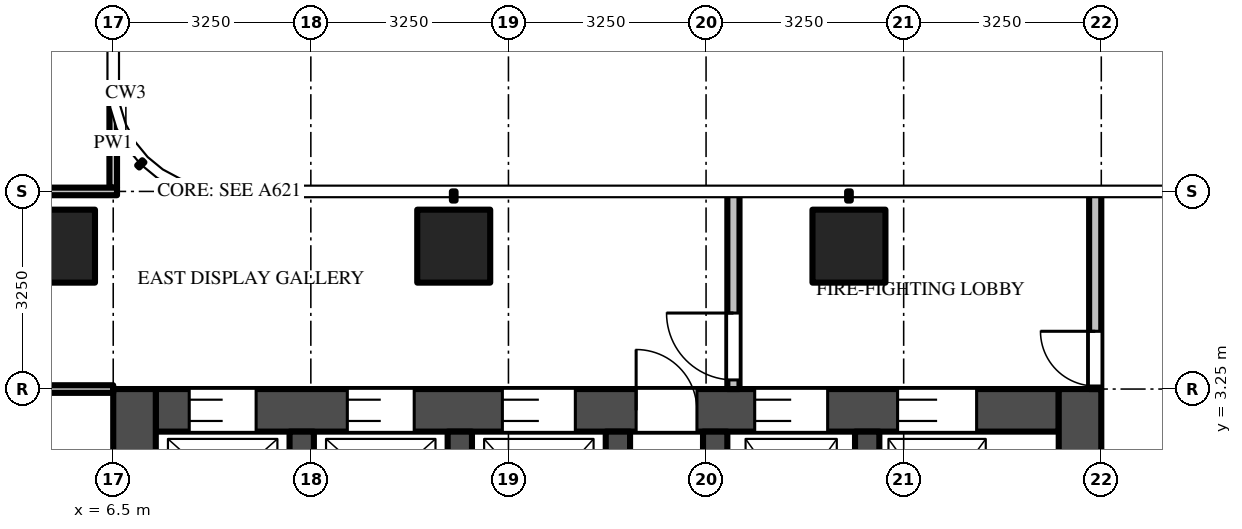
"""IFC4 building model, lengths in metres.
Left out: names, types, materials, properties, quantities, classifications, styles, units other than length and angle.
Written with IfcOpenShell. Run it as: python <this file> out.ifc"""

import sys

from ifc_helpers import new_model, si_unit, direction, frame, frame_2d, origin, origin_2d, place, context, subcontext, project, spatial, rectangle, extrude, source, transform, mapped, element, fill, save


model = new_model("IFC4")
c1 = context("Model", 3, precision=1e-05, world=origin(), true_north=direction((0.0, 1.0)))
c2 = subcontext(c1, "Body", "Model", "MODEL_VIEW")
j1 = project(units=[si_unit("LENGTHUNIT", "METRE"), si_unit("PLANEANGLEUNIT", "RADIAN")], contexts=[c1])
p1 = place(None, origin())
s1 = spatial("IfcSite", under=j1, at=p1, CompositionType="ELEMENT")
p2 = place(p1, origin())
s2 = spatial("IfcBuilding", under=s1, at=p2, CompositionType="ELEMENT")
p3 = place(p2, frame((0.0, 0.0, 173.7)))
s3 = spatial("IfcBuildingStorey", under=s2, at=p3, CompositionType="ELEMENT", Elevation=173.7)
m1 = source(origin(), c2, "Body", "SweptSolid", [
    extrude(rectangle(XDim=1.2, YDim=1.2, at=origin_2d()), origin(), (0.0, 0.0, 1.0), 3.9),
])
for number, where, z_axis, x_axis in (
    (1, (12.1, 5.6, 0.0), (0.0, 0.0, 1.0), (1.0, 0.0, 0.0)),
    (2, (18.6, 5.6, 0.0), (0.0, 0.0, 1.0), (1.0, 0.0, 0.0)),
    (3, (5.6, 5.6, 0.0), (0.0, 0.0, 1.0), (1.0, 0.0, 0.0)),
):
    element("IfcColumn", number, at=place(p3, frame(where, z_axis=z_axis, x_axis=x_axis)), inside=s3, PredefinedType="COLUMN", context=c2, shape_type="MappedRepresentation", body=[
        mapped(m1, transform((0.0, 0.0, 0.0))),
    ])
m2 = source(origin(), c2, "Body", "SweptSolid", [
    extrude(rectangle(XDim=14.85, YDim=0.7, at=frame_2d((7.425, 0.0))), origin(), (0.0, 0.0, 1.0), 3.7),
])
p4 = place(p3, frame((7.2, 2.9, 0.0), z_axis=(0.0, 0.0, 1.0), x_axis=(1.0, 0.0, 0.0)))
e4 = element("IfcWall", 4, at=p4, inside=s3, PredefinedType="SHEAR", context=c2, shape_type="MappedRepresentation", body=[
    mapped(m2, transform((0.0, 0.0, 0.0))),
])
m3 = source(origin(), c2, "Body", "SweptSolid", [
    extrude(rectangle(XDim=1.1, YDim=2.1, at=frame_2d((0.55, 1.05))), frame((0.0, 0.36, 0.0), z_axis=(0.0, -1.0, 0.0), x_axis=(1.0, 0.0, 0.0)), (0.0, 0.0, 1.0), 0.72),
])
p5 = place(p4, frame((0.55, 0.0, 0.0)))
e5 = element("IfcOpeningElement", 5, at=p5, cuts=e4, PredefinedType="OPENING", context=c2, shape_type="MappedRepresentation", body=[
    mapped(m3, transform((0.0, 0.0, 0.0))),
])
p6 = place(p4, frame((3.15, 0.0, 0.0)))
e6 = element("IfcOpeningElement", 6, at=p6, cuts=e4, PredefinedType="OPENING", context=c2, shape_type="MappedRepresentation", body=[
    mapped(m3, transform((0.0, 0.0, 0.0))),
])
m4 = source(origin(), c2, "Body", "SweptSolid", [
    extrude(rectangle(XDim=1.2, YDim=2.1, at=frame_2d((0.6, 1.05))), frame((0.0, 0.36, 0.0), z_axis=(0.0, -1.0, 0.0), x_axis=(1.0, 0.0, 0.0)), (0.0, 0.0, 1.0), 0.72),
])
p7 = place(p4, frame((5.7, 0.0, 0.0)))
e7 = element("IfcOpeningElement", 7, at=p7, cuts=e4, PredefinedType="OPENING", context=c2, shape_type="MappedRepresentation", body=[
    mapped(m4, transform((0.0, 0.0, 0.0))),
])
m5 = source(origin(), c2, "Body", "SweptSolid", [
    extrude(rectangle(XDim=1.3, YDim=2.1, at=frame_2d((0.65, 1.05))), frame((0.0, 0.36, 0.0), z_axis=(0.0, -1.0, 0.0), x_axis=(1.0, 0.0, 0.0)), (0.0, 0.0, 1.0), 0.72),
])
p8 = place(p4, frame((12.2, 0.0, 0.0)))
e8 = element("IfcOpeningElement", 8, at=p8, cuts=e4, PredefinedType="OPENING", context=c2, shape_type="MappedRepresentation", body=[
    mapped(m5, transform((0.0, 0.0, 0.0))),
])
p9 = place(p4, frame((9.85, 0.0, 0.0)))
e9 = element("IfcOpeningElement", 9, at=p9, cuts=e4, PredefinedType="OPENING", context=c2, shape_type="MappedRepresentation", body=[
    mapped(m4, transform((0.0, 0.0, 0.0))),
])
m6 = source(origin(), c2, "Body", "SweptSolid", [
    extrude(rectangle(XDim=1.0, YDim=2.1, at=frame_2d((0.5, 1.05))), frame((0.0, 0.36, 0.0), z_axis=(0.0, -1.0, 0.0), x_axis=(1.0, 0.0, 0.0)), (0.0, 0.0, 1.0), 0.72),
])
p10 = place(p4, frame((7.9, 0.0, 0.0)))
e10 = element("IfcOpeningElement", 10, at=p10, cuts=e4, PredefinedType="OPENING", context=c2, shape_type="MappedRepresentation", body=[
    mapped(m6, transform((0.0, 0.0, 0.0))),
])
m7 = source(origin(), c2, "Body", "SweptSolid", [
    extrude(rectangle(XDim=9.05, YDim=0.7, at=frame_2d((4.525, 0.0))), origin(), (0.0, 0.0, 1.0), 3.7),
])
p11 = place(p3, frame((6.85, -5.8, 0.0), z_axis=(0.0, 0.0, 1.0), x_axis=(0.0, 1.0, 0.0)))
e11 = element("IfcWall", 11, at=p11, inside=s3, PredefinedType="SHEAR", context=c2, shape_type="MappedRepresentation", body=[
    mapped(m7, transform((0.0, 0.0, 0.0))),
])
m8 = source(origin(), c2, "Body", "SweptSolid", [
    extrude(rectangle(XDim=1.8, YDim=2.1, at=frame_2d((0.9, 1.05))), frame((0.0, 0.36, 0.0), z_axis=(0.0, -1.0, 0.0), x_axis=(1.0, 0.0, 0.0)), (0.0, 0.0, 1.0), 0.72),
])
p12 = place(p11, frame((3.15, 0.0, 0.0)))
e12 = element("IfcOpeningElement", 12, at=p12, cuts=e11, PredefinedType="OPENING", context=c2, shape_type="MappedRepresentation", body=[
    mapped(m8, transform((0.0, 0.0, 0.0))),
])
p13 = place(p3, frame((22.4, -5.8, 0.0), z_axis=(0.0, 0.0, 1.0), x_axis=(0.0, 1.0, 0.0)))
e13 = element("IfcWall", 13, at=p13, inside=s3, PredefinedType="SHEAR", context=c2, shape_type="MappedRepresentation", body=[
    mapped(m7, transform((0.0, 0.0, 0.0))),
])
m9 = source(origin(), c2, "Body", "SweptSolid", [
    extrude(rectangle(XDim=2.45, YDim=0.4, at=frame_2d((1.225, 0.0))), origin(), (0.0, 0.0, 1.0), 3.7),
])
for number, where, z_axis, x_axis in (
    (14, (9.6, 0.1, 0.0), (0.0, 0.0, 1.0), (0.0, 1.0, 0.0)),
    (15, (12.2, 0.1, 0.0), (0.0, 0.0, 1.0), (0.0, 1.0, 0.0)),
    (16, (14.8, 0.1, 0.0), (0.0, 0.0, 1.0), (0.0, 1.0, 0.0)),
    (17, (16.4, 0.1, 0.0), (0.0, 0.0, 1.0), (0.0, 1.0, 0.0)),
    (18, (18.9, 0.1, 0.0), (0.0, 0.0, 1.0), (0.0, 1.0, 0.0)),
):
    element("IfcWall", number, at=place(p3, frame(where, z_axis=z_axis, x_axis=x_axis)), inside=s3, PredefinedType="SHEAR", context=c2, shape_type="MappedRepresentation", body=[
        mapped(m9, transform((0.0, 0.0, 0.0))),
    ])
m10 = source(origin(), c2, "Body", "SweptSolid", [
    extrude(rectangle(XDim=3.25, YDim=0.2, at=frame_2d((1.625, 0.0))), origin(), (0.0, 0.0, 1.0), 3.7),
])
p14 = place(p3, frame((16.7, 3.25, 0.0), z_axis=(0.0, 0.0, 1.0), x_axis=(0.0, 1.0, 0.0)))
e19 = element("IfcWall", 19, at=p14, inside=s3, PredefinedType="PARTITIONING", context=c2, shape_type="MappedRepresentation", body=[
    mapped(m10, transform((0.0, 0.0, 0.0))),
])
m11 = source(origin(), c2, "Body", "SweptSolid", [
    extrude(rectangle(XDim=1.1, YDim=2.1, at=frame_2d((0.55, 1.05))), frame((0.0, 0.11, 0.0), z_axis=(0.0, -1.0, 0.0), x_axis=(1.0, 0.0, 0.0)), (0.0, 0.0, 1.0), 0.22),
])
p15 = place(p14, frame((0.15, 0.0, 0.0)))
e20 = element("IfcOpeningElement", 20, at=p15, cuts=e19, PredefinedType="OPENING", context=c2, shape_type="MappedRepresentation", body=[
    mapped(m11, transform((0.0, 0.0, 0.0))),
])
p16 = place(p3, frame((22.65, 3.25, 0.0), z_axis=(0.0, 0.0, 1.0), x_axis=(0.0, 1.0, 0.0)))
e21 = element("IfcWall", 21, at=p16, inside=s3, PredefinedType="PARTITIONING", context=c2, shape_type="MappedRepresentation", body=[
    mapped(m10, transform((0.0, 0.0, 0.0))),
])
m12 = source(origin(), c2, "Body", "SweptSolid", [
    extrude(rectangle(XDim=0.9, YDim=2.1, at=frame_2d((0.45, 1.05))), frame((0.0, 0.11, 0.0), z_axis=(0.0, -1.0, 0.0), x_axis=(1.0, 0.0, 0.0)), (0.0, 0.0, 1.0), 0.22),
])
p17 = place(p16, frame((0.05, 0.0, 0.0)))
e22 = element("IfcOpeningElement", 22, at=p17, cuts=e21, PredefinedType="OPENING", context=c2, shape_type="MappedRepresentation", body=[
    mapped(m12, transform((0.0, 0.0, 0.0))),
])
m13 = source(origin(), c2, "Body", "SweptSolid", [
    extrude(rectangle(XDim=1.469, YDim=0.125, at=frame_2d((0.734, 0.0))), origin(), (0.0, 0.0, 1.0), 3.7),
])
p18 = place(p3, frame((6.5, 6.562, 0.0), z_axis=(0.0, 0.0, 1.0), x_axis=(0.0, 1.0, 0.0)))
e23 = element("IfcWall", 23, at=p18, inside=s3, PredefinedType="PARTITIONING", context=c2, shape_type="MappedRepresentation", body=[
    mapped(m13, transform((0.0, 0.0, 0.0))),
])
m14 = source(origin(), c2, "Body", "SweptSolid", [
    extrude(rectangle(XDim=5.363, YDim=0.125, at=frame_2d((2.681, 0.0))), origin(), (0.0, 0.0, 1.0), 2.997),
])
p19 = place(p3, frame((1.137, 3.25, 0.0), z_axis=(0.0, 0.0, 1.0), x_axis=(1.0, 0.0, 0.0)))
e24 = element("IfcWall", 24, at=p19, inside=s3, PredefinedType="PARTITIONING", context=c2, shape_type="MappedRepresentation", body=[
    mapped(m14, transform((0.0, 0.0, 0.0))),
])
m15 = source(origin(), c2, "Body", "SweptSolid", [
    extrude(rectangle(XDim=5.425, YDim=0.125, at=frame_2d((2.712, 0.0))), origin(), (0.0, 0.0, 1.0), 2.78),
])
p20 = place(p3, frame((1.137, 6.5, 0.0), z_axis=(0.0, 0.0, 1.0), x_axis=(1.0, 0.0, 0.0)))
e25 = element("IfcWall", 25, at=p20, inside=s3, PredefinedType="PARTITIONING", context=c2, shape_type="MappedRepresentation", body=[
    mapped(m15, transform((0.0, 0.0, 0.0))),
])
m16 = source(origin(), c2, "Body", "SweptSolid", [
    extrude(rectangle(XDim=1.0, YDim=2.1, at=frame_2d((0.5, 1.05))), frame((0.0, 0.073, 0.0), z_axis=(0.0, -1.0, 0.0), x_axis=(1.0, 0.0, 0.0)), (0.0, 0.0, 1.0), 0.145),
])
p21 = place(p20, frame((0.413, 0.0, 0.0)))
e26 = element("IfcOpeningElement", 26, at=p21, cuts=e25, PredefinedType="OPENING", context=c2, shape_type="MappedRepresentation", body=[
    mapped(m16, transform((0.0, 0.0, 0.0))),
])
m17 = source(origin(), c2, "Body", "SweptSolid", [
    extrude(rectangle(XDim=1.1, YDim=2.1, at=frame_2d((0.55, 1.05))), frame((0.0, -0.275, 0.0), z_axis=(0.0, -1.0, 0.0), x_axis=(1.0, 0.0, 0.0)), (0.0, 0.0, 1.0), 0.05),
])
p22 = place(p5, origin())
e27 = element("IfcDoor", 27, at=p22, inside=s3, OperationType="DOUBLE_DOOR_SLIDING", PredefinedType="DOOR", context=c2, shape_type="MappedRepresentation", body=[
    mapped(m17, transform((0.0, 0.0, 0.0))),
])
fill(e5, e27)
p23 = place(p6, origin())
e28 = element("IfcDoor", 28, at=p23, inside=s3, OperationType="DOUBLE_DOOR_SLIDING", PredefinedType="DOOR", context=c2, shape_type="MappedRepresentation", body=[
    mapped(m17, transform((0.0, 0.0, 0.0))),
])
fill(e6, e28)
m18 = source(origin(), c2, "Body", "SweptSolid", [
    extrude(rectangle(XDim=1.2, YDim=2.1, at=frame_2d((0.6, 1.05))), frame((0.0, -0.275, 0.0), z_axis=(0.0, -1.0, 0.0), x_axis=(1.0, 0.0, 0.0)), (0.0, 0.0, 1.0), 0.05),
])
p24 = place(p7, origin())
e29 = element("IfcDoor", 29, at=p24, inside=s3, OperationType="DOUBLE_DOOR_SLIDING", PredefinedType="DOOR", context=c2, shape_type="MappedRepresentation", body=[
    mapped(m18, transform((0.0, 0.0, 0.0))),
])
fill(e7, e29)
m19 = source(origin(), c2, "Body", "SweptSolid", [
    extrude(rectangle(XDim=1.3, YDim=2.1, at=frame_2d((0.65, 1.05))), frame((0.0, -0.275, 0.0), z_axis=(0.0, -1.0, 0.0), x_axis=(1.0, 0.0, 0.0)), (0.0, 0.0, 1.0), 0.05),
])
p25 = place(p8, origin())
e30 = element("IfcDoor", 30, at=p25, inside=s3, OperationType="DOUBLE_DOOR_SLIDING", PredefinedType="DOOR", context=c2, shape_type="MappedRepresentation", body=[
    mapped(m19, transform((0.0, 0.0, 0.0))),
])
fill(e8, e30)
p26 = place(p9, origin())
e31 = element("IfcDoor", 31, at=p26, inside=s3, OperationType="DOUBLE_DOOR_SLIDING", PredefinedType="DOOR", context=c2, shape_type="MappedRepresentation", body=[
    mapped(m18, transform((0.0, 0.0, 0.0))),
])
fill(e9, e31)
m20 = source(origin(), c2, "Body", "SweptSolid", [
    extrude(rectangle(XDim=1.0, YDim=2.1, at=frame_2d((0.5, 1.05))), frame((0.0, -0.275, 0.0), z_axis=(0.0, -1.0, 0.0), x_axis=(1.0, 0.0, 0.0)), (0.0, 0.0, 1.0), 0.05),
])
p27 = place(p10, origin())
e32 = element("IfcDoor", 32, at=p27, inside=s3, OperationType="SINGLE_SWING_LEFT", PredefinedType="DOOR", context=c2, shape_type="MappedRepresentation", body=[
    mapped(m20, transform((0.0, 0.0, 0.0))),
])
fill(e10, e32)
m21 = source(origin(), c2, "Body", "SweptSolid", [
    extrude(rectangle(XDim=1.1, YDim=2.1, at=frame_2d((0.55, 1.05))), frame((0.0, 0.025, 0.0), z_axis=(0.0, -1.0, 0.0), x_axis=(1.0, 0.0, 0.0)), (0.0, 0.0, 1.0), 0.05),
])
p28 = place(p15, origin())
e33 = element("IfcDoor", 33, at=p28, inside=s3, OperationType="SINGLE_SWING_RIGHT", PredefinedType="DOOR", context=c2, shape_type="MappedRepresentation", body=[
    mapped(m21, transform((0.0, 0.0, 0.0))),
])
fill(e20, e33)
m22 = source(origin(), c2, "Body", "SweptSolid", [
    extrude(rectangle(XDim=0.9, YDim=2.1, at=frame_2d((0.45, 1.05))), frame((0.0, 0.025, 0.0), z_axis=(0.0, -1.0, 0.0), x_axis=(1.0, 0.0, 0.0)), (0.0, 0.0, 1.0), 0.05),
])
p29 = place(p17, origin())
e34 = element("IfcDoor", 34, at=p29, inside=s3, OperationType="SINGLE_SWING_RIGHT", PredefinedType="DOOR", context=c2, shape_type="MappedRepresentation", body=[
    mapped(m22, transform((0.0, 0.0, 0.0))),
])
fill(e22, e34)
save(model, sys.argv[1])
